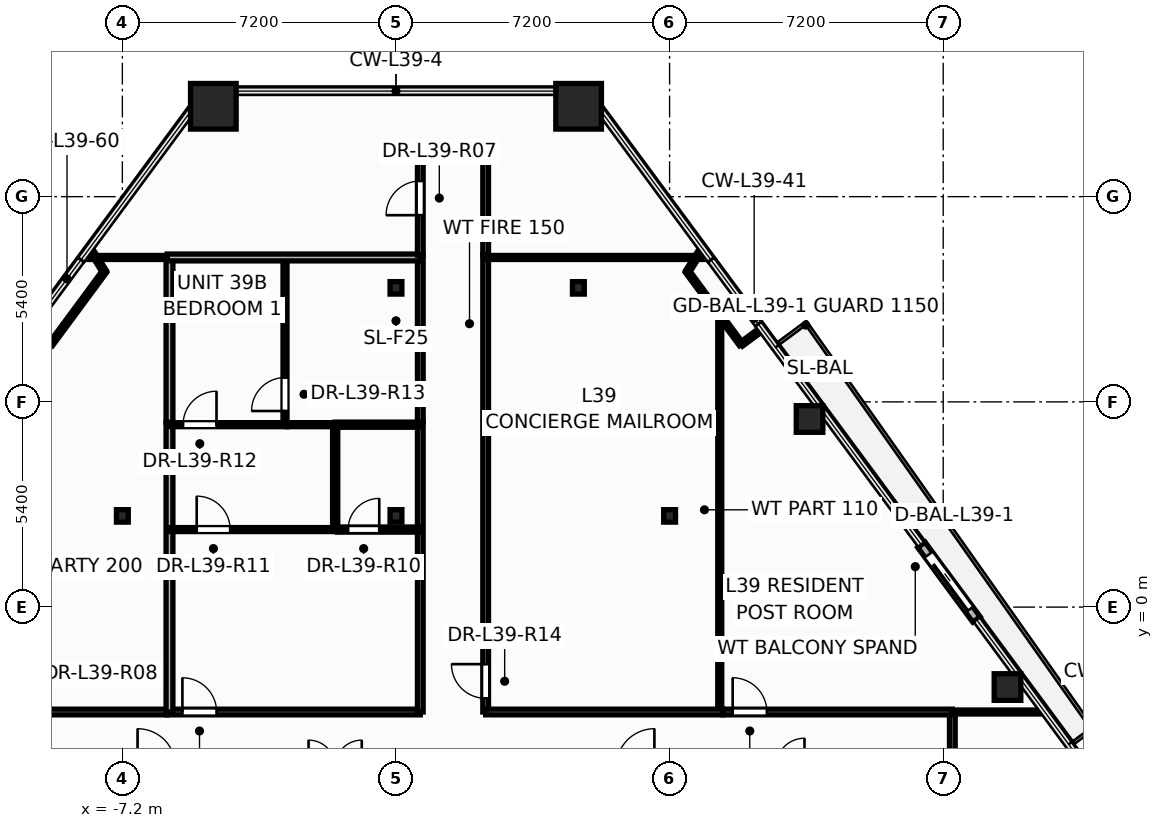
"""IFC4 building model, lengths in metres.
Left out: names, types, materials, properties, quantities, classifications, styles, units other than length and angle.
Written with IfcOpenShell. Run it as: python <this file> out.ifc"""

import sys

from ifc_helpers import new_model, si_unit, direction, frame, frame_2d, origin, origin_2d, place, context, subcontext, project, spatial, rectangle, hollow_rectangle, hollow_circle, i_section, extrude, element, fill, save


model = new_model("IFC4")
c1 = context("Model", 3, precision=1e-05, world=origin(), true_north=direction((0.0, 1.0)))
c2 = subcontext(c1, "Body", "Model", "MODEL_VIEW")
j1 = project(units=[si_unit("LENGTHUNIT", "METRE"), si_unit("PLANEANGLEUNIT", "RADIAN")], contexts=[c1])
p1 = place(None, origin())
s1 = spatial("IfcSite", under=j1, at=p1, CompositionType="ELEMENT")
p2 = place(p1, origin())
s2 = spatial("IfcBuilding", under=s1, at=p2, CompositionType="ELEMENT")
p3 = place(p2, frame((0.0, 0.0, 150.9)))
s3 = spatial("IfcBuildingStorey", under=s2, at=p3, CompositionType="ELEMENT", Elevation=150.9)
for number, where, z_axis, x_axis in (
    (1, (4.806, 13.178, 0.0), (0.0, 0.0, 1.0), (1.0, 0.0, 0.0)),
    (2, (-4.806, 13.178, 0.0), (0.0, 0.0, 1.0), (1.0, 0.0, 0.0)),
):
    element("IfcColumn", number, at=place(p3, frame(where, z_axis=z_axis, x_axis=x_axis)), inside=s3, PredefinedType="COLUMN", context=c2, shape_type="SweptSolid", body=[
        extrude(hollow_rectangle(XDim=1.2, YDim=1.2, WallThickness=0.055, at=origin_2d()), origin(), (0.0, 0.0, 1.0), 3.6),
    ])
for number, where, z_axis, x_axis in (
    (3, (16.092, -2.103, 0.0), (0.0, 0.0, 1.0), (1.0, 0.0, 0.0)),
    (4, (10.883, 4.95, 0.0), (0.0, 0.0, 1.0), (1.0, 0.0, 0.0)),
):
    element("IfcColumn", number, at=place(p3, frame(where, z_axis=z_axis, x_axis=x_axis)), inside=s3, PredefinedType="COLUMN", context=c2, shape_type="SweptSolid", body=[
        extrude(hollow_circle(Radius=0.35, WallThickness=0.03, at=origin_2d()), origin(), (0.0, 0.0, 1.0), 3.6),
    ])
for number, where, z_axis, x_axis in (
    (5, (-7.2, 2.4, 0.0), (0.0, 0.0, 1.0), (1.0, 0.0, 0.0)),
    (6, (0.0, 2.4, 0.0), (0.0, 0.0, 1.0), (1.0, 0.0, 0.0)),
    (7, (7.2, 2.4, 0.0), (0.0, 0.0, 1.0), (1.0, 0.0, 0.0)),
    (8, (-4.8, 8.4, 0.0), (0.0, 0.0, 1.0), (1.0, 0.0, 0.0)),
    (9, (0.0, 8.4, 0.0), (0.0, 0.0, 1.0), (1.0, 0.0, 0.0)),
    (10, (4.8, 8.4, 0.0), (0.0, 0.0, 1.0), (1.0, 0.0, 0.0)),
):
    element("IfcColumn", number, at=place(p3, frame(where, z_axis=z_axis, x_axis=x_axis)), inside=s3, PredefinedType="COLUMN", context=c2, shape_type="SweptSolid", body=[
        extrude(i_section(OverallWidth=0.311, OverallDepth=0.327, WebThickness=0.016, FlangeThickness=0.025, at=origin_2d()), origin(), (0.0, 0.0, 1.0), 3.6),
    ])
p4 = place(p3, frame((15.275, -0.324, -0.015), z_axis=(0.0, 0.0, 1.0), x_axis=(-0.594092829232, 0.804396488216, 0.0)))
e11 = element("IfcWall", 11, at=p4, inside=s3, PredefinedType="STANDARD", context=c2, shape_type="SweptSolid", body=[
    extrude(rectangle(XDim=2.44, YDim=0.24, at=frame_2d((1.22, 0.0))), origin(), (0.0, 0.0, 1.0), 2.807),
])
p5 = place(p4, frame((0.32, 0.0, 0.015)))
e12 = element("IfcOpeningElement", 12, at=p5, cuts=e11, PredefinedType="OPENING", context=c2, shape_type="SweptSolid", body=[
    extrude(rectangle(XDim=1.806, YDim=2.204, at=frame_2d((0.9, 1.102))), frame((0.0, 0.13, 0.0), z_axis=(0.0, -1.0, 0.0), x_axis=(1.0, 0.0, 0.0)), (0.0, 0.0, 1.0), 0.26),
])
p6 = place(p3, frame((2.36, -2.76, 0.0), z_axis=(0.0, 0.0, 1.0), x_axis=(0.0, 1.0, 0.0)))
e13 = element("IfcWall", 13, at=p6, inside=s3, PredefinedType="PARTITIONING", context=c2, shape_type="SweptSolid", body=[
    extrude(rectangle(XDim=12.02, YDim=0.15, at=frame_2d((6.01, 0.0))), origin(), (0.0, 0.0, 1.0), 2.325),
])
p7 = place(p6, frame((0.359, 0.0, 0.0)))
e14 = element("IfcOpeningElement", 14, at=p7, cuts=e13, PredefinedType="OPENING", context=c2, shape_type="SweptSolid", body=[
    extrude(rectangle(XDim=0.906, YDim=2.104, at=frame_2d((0.45, 1.052))), frame((0.0, 0.085, 0.0), z_axis=(0.0, -1.0, 0.0), x_axis=(1.0, 0.0, 0.0)), (0.0, 0.0, 1.0), 0.17),
])
p8 = place(p3, frame((8.52, -2.76, 0.0), z_axis=(0.0, 0.0, 1.0), x_axis=(0.0, 1.0, 0.0)))
e15 = element("IfcWall", 15, at=p8, inside=s3, PredefinedType="PARTITIONING", context=c2, shape_type="SweptSolid", body=[
    extrude(rectangle(XDim=10.64, YDim=0.105, at=frame_2d((5.32, 0.0))), origin(), (0.0, 0.0, 1.0), 2.617),
])
p9 = place(p3, frame((14.64, -10.8, 0.0), z_axis=(0.0, 0.0, 1.0), x_axis=(0.0, 1.0, 0.0)))
e16 = element("IfcWall", 16, at=p9, inside=s3, PredefinedType="PARTITIONING", context=c2, shape_type="SweptSolid", body=[
    extrude(rectangle(XDim=8.04, YDim=0.15, at=frame_2d((4.02, 0.0))), origin(), (0.0, 0.0, 1.0), 2.325),
])
p10 = place(p9, frame((0.359, 0.0, 0.0)))
e17 = element("IfcOpeningElement", 17, at=p10, cuts=e16, PredefinedType="OPENING", context=c2, shape_type="SweptSolid", body=[
    extrude(rectangle(XDim=0.906, YDim=2.104, at=frame_2d((0.45, 1.052))), frame((0.0, 0.085, 0.0), z_axis=(0.0, -1.0, 0.0), x_axis=(1.0, 0.0, 0.0)), (0.0, 0.0, 1.0), 0.17),
])
p11 = place(p3, frame((-6.02, -2.76, 0.0), z_axis=(0.0, 0.0, 1.0), x_axis=(1.0, 0.0, 0.0)))
e18 = element("IfcWall", 18, at=p11, inside=s3, PredefinedType="PARTITIONING", context=c2, shape_type="SweptSolid", body=[
    extrude(rectangle(XDim=6.66, YDim=0.15, at=frame_2d((3.33, 0.0))), origin(), (0.0, 0.0, 1.0), 2.325),
])
p12 = place(p11, frame((0.4, 0.0, 0.0)))
e19 = element("IfcOpeningElement", 19, at=p12, cuts=e18, PredefinedType="OPENING", context=c2, shape_type="SweptSolid", body=[
    extrude(rectangle(XDim=0.906, YDim=2.104, at=frame_2d((0.45, 1.052))), frame((0.0, 0.085, 0.0), z_axis=(0.0, -1.0, 0.0), x_axis=(1.0, 0.0, 0.0)), (0.0, 0.0, 1.0), 0.17),
])
p13 = place(p3, frame((-12.5, -2.76, 0.0), z_axis=(0.0, 0.0, 1.0), x_axis=(1.0, 0.0, 0.0)))
e20 = element("IfcWall", 20, at=p13, inside=s3, PredefinedType="PARTITIONING", context=c2, shape_type="SweptSolid", body=[
    extrude(rectangle(XDim=6.478, YDim=0.15, at=frame_2d((3.239, 0.0))), origin(), (0.0, 0.0, 1.0), 2.325),
])
p14 = place(p13, frame((1.674, 0.0, 0.0)))
e21 = element("IfcOpeningElement", 21, at=p14, cuts=e20, PredefinedType="OPENING", context=c2, shape_type="SweptSolid", body=[
    extrude(rectangle(XDim=0.906, YDim=2.104, at=frame_2d((0.45, 1.052))), frame((0.0, 0.085, 0.0), z_axis=(0.0, -1.0, 0.0), x_axis=(1.0, 0.0, 0.0)), (0.0, 0.0, 1.0), 0.17),
])
p15 = place(p3, frame((2.36, -2.76, 0.0), z_axis=(0.0, 0.0, 1.0), x_axis=(1.0, 0.0, 0.0)))
e22 = element("IfcWall", 22, at=p15, inside=s3, PredefinedType="PARTITIONING", context=c2, shape_type="SweptSolid", body=[
    extrude(rectangle(XDim=6.24, YDim=0.15, at=frame_2d((3.12, 0.0))), origin(), (0.0, 0.0, 1.0), 2.325),
])
p16 = place(p3, frame((8.602, -2.76, 0.0), z_axis=(0.0, 0.0, 1.0), x_axis=(1.0, 0.0, 0.0)))
e23 = element("IfcWall", 23, at=p16, inside=s3, PredefinedType="PARTITIONING", context=c2, shape_type="SweptSolid", body=[
    extrude(rectangle(XDim=6.038, YDim=0.15, at=frame_2d((3.019, 0.0))), origin(), (0.0, 0.0, 1.0), 3.35),
])
p17 = place(p16, frame((0.258, 0.0, 0.0)))
e24 = element("IfcOpeningElement", 24, at=p17, cuts=e23, PredefinedType="OPENING", context=c2, shape_type="SweptSolid", body=[
    extrude(rectangle(XDim=0.906, YDim=2.104, at=frame_2d((0.45, 1.052))), frame((0.0, 0.085, 0.0), z_axis=(0.0, -1.0, 0.0), x_axis=(1.0, 0.0, 0.0)), (0.0, 0.0, 1.0), 0.17),
])
p18 = place(p3, frame((2.36, 9.2, 0.0), z_axis=(0.0, 0.0, 1.0), x_axis=(1.0, 0.0, 0.0)))
e25 = element("IfcWall", 25, at=p18, inside=s3, PredefinedType="PARTITIONING", context=c2, shape_type="SweptSolid", body=[
    extrude(rectangle(XDim=5.76, YDim=0.105, at=frame_2d((2.88, 0.0))), origin(), (0.0, 0.0, 1.0), 2.617),
])
p19 = place(p3, frame((0.64, -2.76, 0.0), z_axis=(0.0, 0.0, 1.0), x_axis=(0.0, 1.0, 0.0)))
e26 = element("IfcWall", 26, at=p19, inside=s3, PredefinedType="PARTITIONING", context=c2, shape_type="SweptSolid", body=[
    extrude(rectangle(XDim=7.62, YDim=0.15, at=frame_2d((3.81, 0.0))), origin(), (0.0, 0.0, 1.0), 2.325),
])
p20 = place(p3, frame((-5.96, -2.76, 0.0), z_axis=(0.0, 0.0, 1.0), x_axis=(0.0, 1.0, 0.0)))
e27 = element("IfcWall", 27, at=p20, inside=s3, PredefinedType="PARTITIONING", context=c2, shape_type="SweptSolid", body=[
    extrude(rectangle(XDim=7.62, YDim=0.18, at=frame_2d((3.81, 0.0))), origin(), (0.0, 0.0, 1.0), 2.325),
])
p21 = place(p3, frame((0.64, 4.862, 0.0), z_axis=(0.0, 0.0, 1.0), x_axis=(0.0, 1.0, 0.0)))
e28 = element("IfcWall", 28, at=p21, inside=s3, PredefinedType="PARTITIONING", context=c2, shape_type="SweptSolid", body=[
    extrude(rectangle(XDim=4.398, YDim=0.15, at=frame_2d((2.199, 0.0))), origin(), (0.0, 0.0, 1.0), 2.617),
])
p22 = place(p3, frame((-5.96, 4.862, 0.0), z_axis=(0.0, 0.0, 1.0), x_axis=(0.0, 1.0, 0.0)))
e29 = element("IfcWall", 29, at=p22, inside=s3, PredefinedType="PARTITIONING", context=c2, shape_type="SweptSolid", body=[
    extrude(rectangle(XDim=4.338, YDim=0.18, at=frame_2d((2.169, 0.0))), origin(), (0.0, 0.0, 1.0), 2.617),
])
p23 = place(p3, frame((-5.96, 2.04, 0.0), z_axis=(0.0, 0.0, 1.0), x_axis=(1.0, 0.0, 0.0)))
e30 = element("IfcWall", 30, at=p23, inside=s3, PredefinedType="PARTITIONING", context=c2, shape_type="SweptSolid", body=[
    extrude(rectangle(XDim=4.42, YDim=0.105, at=frame_2d((2.21, 0.0))), origin(), (0.0, 0.0, 1.0), 2.919),
])
p24 = place(p23, frame((0.716, 0.0, 0.0)))
e31 = element("IfcOpeningElement", 31, at=p24, cuts=e30, PredefinedType="OPENING", context=c2, shape_type="SweptSolid", body=[
    extrude(rectangle(XDim=0.886, YDim=2.104, at=frame_2d((0.44, 1.052))), frame((0.0, 0.062, 0.0), z_axis=(0.0, -1.0, 0.0), x_axis=(1.0, 0.0, 0.0)), (0.0, 0.0, 1.0), 0.125),
])
p25 = place(p3, frame((-2.92, 4.8, 0.0), z_axis=(0.0, 0.0, 1.0), x_axis=(0.0, 1.0, 0.0)))
e32 = element("IfcWall", 32, at=p25, inside=s3, PredefinedType="PARTITIONING", context=c2, shape_type="SweptSolid", body=[
    extrude(rectangle(XDim=4.4, YDim=0.105, at=frame_2d((2.2, 0.0))), origin(), (0.0, 0.0, 1.0), 2.617),
])
p26 = place(p25, frame((0.36, 0.0, 0.0)))
e33 = element("IfcOpeningElement", 33, at=p26, cuts=e32, PredefinedType="OPENING", context=c2, shape_type="SweptSolid", body=[
    extrude(rectangle(XDim=0.886, YDim=2.104, at=frame_2d((0.44, 1.052))), frame((0.0, 0.062, 0.0), z_axis=(0.0, -1.0, 0.0), x_axis=(1.0, 0.0, 0.0)), (0.0, 0.0, 1.0), 0.125),
])
p27 = place(p3, frame((-6.02, 9.2, 0.0), z_axis=(0.0, 0.0, 1.0), x_axis=(1.0, 0.0, 0.0)))
e34 = element("IfcWall", 34, at=p27, inside=s3, PredefinedType="PARTITIONING", context=c2, shape_type="SweptSolid", body=[
    extrude(rectangle(XDim=6.66, YDim=0.18, at=frame_2d((3.33, 0.0))), origin(), (0.0, 0.0, 1.0), 2.617),
])
p28 = place(p3, frame((-5.96, 4.8, 0.0), z_axis=(0.0, 0.0, 1.0), x_axis=(1.0, 0.0, 0.0)))
e35 = element("IfcWall", 35, at=p28, inside=s3, PredefinedType="PARTITIONING", context=c2, shape_type="SweptSolid", body=[
    extrude(rectangle(XDim=3.1, YDim=0.105, at=frame_2d((1.55, 0.0))), origin(), (0.0, 0.0, 1.0), 3.35),
])
p29 = place(p28, frame((0.358, 0.0, 0.0)))
e36 = element("IfcOpeningElement", 36, at=p29, cuts=e35, PredefinedType="OPENING", context=c2, shape_type="SweptSolid", body=[
    extrude(rectangle(XDim=0.886, YDim=2.104, at=frame_2d((0.44, 1.052))), frame((0.0, 0.062, 0.0), z_axis=(0.0, -1.0, 0.0), x_axis=(1.0, 0.0, 0.0)), (0.0, 0.0, 1.0), 0.125),
])
p30 = place(p3, frame((-1.6, 2.04, 0.0), z_axis=(0.0, 0.0, 1.0), x_axis=(0.0, 1.0, 0.0)))
e37 = element("IfcWall", 37, at=p30, inside=s3, PredefinedType="PARTITIONING", context=c2, shape_type="SweptSolid", body=[
    extrude(rectangle(XDim=2.76, YDim=0.135, at=frame_2d((1.38, 0.0))), origin(), (0.0, 0.0, 1.0), 2.325),
])
p31 = place(p3, frame((0.64, 9.262, 0.0), z_axis=(0.0, 0.0, 1.0), x_axis=(0.0, 1.0, 0.0)))
e38 = element("IfcWall", 38, at=p31, inside=s3, PredefinedType="PARTITIONING", context=c2, shape_type="SweptSolid", body=[
    extrude(rectangle(XDim=2.538, YDim=0.15, at=frame_2d((1.269, 0.0))), origin(), (0.0, 0.0, 1.0), 3.35),
])
p32 = place(p31, frame((1.05, 0.0, 0.0)))
e39 = element("IfcOpeningElement", 39, at=p32, cuts=e38, PredefinedType="OPENING", context=c2, shape_type="SweptSolid", body=[
    extrude(rectangle(XDim=0.906, YDim=2.104, at=frame_2d((0.45, 1.052))), frame((0.0, 0.085, 0.0), z_axis=(0.0, -1.0, 0.0), x_axis=(1.0, 0.0, 0.0)), (0.0, 0.0, 1.0), 0.17),
])
p33 = place(p3, frame((2.36, 9.262, 0.0), z_axis=(0.0, 0.0, 1.0), x_axis=(0.0, 1.0, 0.0)))
e40 = element("IfcWall", 40, at=p33, inside=s3, PredefinedType="PARTITIONING", context=c2, shape_type="SweptSolid", body=[
    extrude(rectangle(XDim=2.538, YDim=0.15, at=frame_2d((1.269, 0.0))), origin(), (0.0, 0.0, 1.0), 3.35),
])
p34 = place(p3, frame((14.64, -2.76, 0.0), z_axis=(0.0, 0.0, 1.0), x_axis=(1.0, 0.0, 0.0)))
e41 = element("IfcWall", 41, at=p34, inside=s3, PredefinedType="PARTITIONING", context=c2, shape_type="SweptSolid", body=[
    extrude(rectangle(XDim=2.434, YDim=0.105, at=frame_2d((1.217, 0.0))), origin(), (0.0, 0.0, 1.0), 2.792),
])
for number, where, z_axis, x_axis in (
    (42, (-7.671, 8.827, 0.0), (0.0, 0.0, 1.0), (-0.594, -0.804, 0.0)),
    (43, (9.084, 6.914, 0.0), (0.0, 0.0, 1.0), (-0.594, 0.804, 0.0)),
):
    element("IfcWall", number, at=place(p3, frame(where, z_axis=z_axis, x_axis=x_axis)), inside=s3, PredefinedType="PARTITIONING", context=c2, shape_type="SweptSolid", body=[
        extrude(rectangle(XDim=2.378, YDim=0.12, at=frame_2d((1.189, 0.0))), origin(), (0.0, 0.0, 1.0), 3.35),
    ])
p35 = place(p3, frame((-1.538, 2.04, 0.0), z_axis=(0.0, 0.0, 1.0), x_axis=(1.0, 0.0, 0.0)))
e44 = element("IfcWall", 44, at=p35, inside=s3, PredefinedType="PARTITIONING", context=c2, shape_type="SweptSolid", body=[
    extrude(rectangle(XDim=2.178, YDim=0.135, at=frame_2d((1.089, 0.0))), origin(), (0.0, 0.0, 1.0), 2.325),
])
p36 = place(p35, frame((0.278, 0.0, 0.0)))
e45 = element("IfcOpeningElement", 45, at=p36, cuts=e44, PredefinedType="OPENING", context=c2, shape_type="SweptSolid", body=[
    extrude(rectangle(XDim=0.826, YDim=2.104, at=frame_2d((0.41, 1.052))), frame((0.0, 0.078, 0.0), z_axis=(0.0, -1.0, 0.0), x_axis=(1.0, 0.0, 0.0)), (0.0, 0.0, 1.0), 0.155),
])
p37 = place(p3, frame((-1.6, 4.8, 0.0), z_axis=(0.0, 0.0, 1.0), x_axis=(1.0, 0.0, 0.0)))
e46 = element("IfcWall", 46, at=p37, inside=s3, PredefinedType="PARTITIONING", context=c2, shape_type="SweptSolid", body=[
    extrude(rectangle(XDim=2.24, YDim=0.135, at=frame_2d((1.12, 0.0))), origin(), (0.0, 0.0, 1.0), 2.325),
])
p38 = place(p3, frame((-8.12, 9.2, 0.0), z_axis=(0.0, 0.0, 1.0), x_axis=(1.0, 0.0, 0.0)))
e47 = element("IfcWall", 47, at=p38, inside=s3, PredefinedType="PARTITIONING", context=c2, shape_type="SweptSolid", body=[
    extrude(rectangle(XDim=2.098, YDim=0.105, at=frame_2d((1.049, 0.0))), origin(), (0.0, 0.0, 1.0), 2.792),
])
p39 = place(p3, frame((0.64, 11.8, 0.0), z_axis=(0.0, 0.0, 1.0), x_axis=(1.0, 0.0, 0.0)))
e48 = element("IfcWall", 48, at=p39, inside=s3, PredefinedType="PARTITIONING", context=c2, shape_type="SweptSolid", body=[
    extrude(rectangle(XDim=1.72, YDim=0.15, at=frame_2d((0.86, 0.0))), origin(), (0.0, 0.0, 1.0), 3.35),
])
p40 = place(p3, frame((-2.858, 4.8, 0.0), z_axis=(0.0, 0.0, 1.0), x_axis=(1.0, 0.0, 0.0)))
e49 = element("IfcWall", 49, at=p40, inside=s3, PredefinedType="PARTITIONING", context=c2, shape_type="SweptSolid", body=[
    extrude(rectangle(XDim=1.258, YDim=0.105, at=frame_2d((0.629, 0.0))), origin(), (0.0, 0.0, 1.0), 2.919),
])
for number, where, z_axis, x_axis in (
    (50, (-8.054, 9.437, 0.0), (0.0, 0.0, 1.0), (0.532, -0.847, 0.0)),
    (51, (7.671, 8.827, 0.0), (0.0, 0.0, 1.0), (0.532, 0.847, 0.0)),
):
    element("IfcWall", number, at=place(p3, frame(where, z_axis=z_axis, x_axis=x_axis)), inside=s3, PredefinedType="PARTITIONING", context=c2, shape_type="SweptSolid", body=[
        extrude(rectangle(XDim=0.72, YDim=0.12, at=frame_2d((0.36, 0.0))), origin(), (0.0, 0.0, 1.0), 2.792),
    ])
for number, where, z_axis, x_axis in (
    (52, (-9.084, 6.914, 0.0), (0.0, 0.0, 1.0), (-0.804, 0.594, 0.0)),
    (53, (9.623, 7.312, 0.0), (0.0, 0.0, 1.0), (-0.804, -0.594, 0.0)),
):
    element("IfcWall", number, at=place(p3, frame(where, z_axis=z_axis, x_axis=x_axis)), inside=s3, PredefinedType="PARTITIONING", context=c2, shape_type="SweptSolid", body=[
        extrude(rectangle(XDim=0.67, YDim=0.12, at=frame_2d((0.335, 0.0))), origin(), (0.0, 0.0, 1.0), 2.792),
    ])
p41 = place(p5, origin())
e54 = element("IfcDoor", 54, at=p41, inside=s3, OperationType="SLIDING_TO_LEFT", PredefinedType="DOOR", context=c2, shape_type="SweptSolid", body=[
    extrude(rectangle(XDim=1.8, YDim=2.2, at=frame_2d((0.9, 1.1))), frame((0.0, 0.025, 0.0), z_axis=(0.0, -1.0, 0.0), x_axis=(1.0, 0.0, 0.0)), (0.0, 0.0, 1.0), 0.05),
])
fill(e12, e54)
p42 = place(p32, origin())
e55 = element("IfcDoor", 55, at=p42, inside=s3, OperationType="SINGLE_SWING_LEFT", PredefinedType="DOOR", context=c2, shape_type="SweptSolid", body=[
    extrude(rectangle(XDim=0.9, YDim=2.1, at=frame_2d((0.45, 1.05))), frame((0.0, 0.025, 0.0), z_axis=(0.0, -1.0, 0.0), x_axis=(1.0, 0.0, 0.0)), (0.0, 0.0, 1.0), 0.05),
])
fill(e39, e55)
p43 = place(p12, origin())
e56 = element("IfcDoor", 56, at=p43, inside=s3, OperationType="SINGLE_SWING_LEFT", PredefinedType="DOOR", context=c2, shape_type="SweptSolid", body=[
    extrude(rectangle(XDim=0.9, YDim=2.1, at=frame_2d((0.45, 1.05))), frame((0.0, 0.025, 0.0), z_axis=(0.0, -1.0, 0.0), x_axis=(1.0, 0.0, 0.0)), (0.0, 0.0, 1.0), 0.05),
])
fill(e19, e56)
p44 = place(p36, origin())
e57 = element("IfcDoor", 57, at=p44, inside=s3, OperationType="SINGLE_SWING_RIGHT", PredefinedType="DOOR", context=c2, shape_type="SweptSolid", body=[
    extrude(rectangle(XDim=0.82, YDim=2.1, at=frame_2d((0.41, 1.05))), frame((0.0, 0.025, 0.0), z_axis=(0.0, -1.0, 0.0), x_axis=(1.0, 0.0, 0.0)), (0.0, 0.0, 1.0), 0.05),
])
fill(e45, e57)
p45 = place(p24, origin())
e58 = element("IfcDoor", 58, at=p45, inside=s3, OperationType="SINGLE_SWING_LEFT", PredefinedType="DOOR", context=c2, shape_type="SweptSolid", body=[
    extrude(rectangle(XDim=0.88, YDim=2.1, at=frame_2d((0.44, 1.05))), frame((0.0, 0.025, 0.0), z_axis=(0.0, -1.0, 0.0), x_axis=(1.0, 0.0, 0.0)), (0.0, 0.0, 1.0), 0.05),
])
fill(e31, e58)
p46 = place(p29, origin())
e59 = element("IfcDoor", 59, at=p46, inside=s3, OperationType="SINGLE_SWING_RIGHT", PredefinedType="DOOR", context=c2, shape_type="SweptSolid", body=[
    extrude(rectangle(XDim=0.88, YDim=2.1, at=frame_2d((0.44, 1.05))), frame((0.0, 0.025, 0.0), z_axis=(0.0, -1.0, 0.0), x_axis=(1.0, 0.0, 0.0)), (0.0, 0.0, 1.0), 0.05),
])
fill(e36, e59)
p47 = place(p26, origin())
e60 = element("IfcDoor", 60, at=p47, inside=s3, OperationType="SINGLE_SWING_LEFT", PredefinedType="DOOR", context=c2, shape_type="SweptSolid", body=[
    extrude(rectangle(XDim=0.88, YDim=2.1, at=frame_2d((0.44, 1.05))), frame((0.0, 0.025, 0.0), z_axis=(0.0, -1.0, 0.0), x_axis=(1.0, 0.0, 0.0)), (0.0, 0.0, 1.0), 0.05),
])
fill(e33, e60)
p48 = place(p7, origin())
e61 = element("IfcDoor", 61, at=p48, inside=s3, OperationType="SINGLE_SWING_RIGHT", PredefinedType="DOOR", context=c2, shape_type="SweptSolid", body=[
    extrude(rectangle(XDim=0.9, YDim=2.1, at=frame_2d((0.45, 1.05))), frame((0.0, 0.025, 0.0), z_axis=(0.0, -1.0, 0.0), x_axis=(1.0, 0.0, 0.0)), (0.0, 0.0, 1.0), 0.05),
])
fill(e14, e61)
p49 = place(p17, origin())
e62 = element("IfcDoor", 62, at=p49, inside=s3, OperationType="SINGLE_SWING_LEFT", PredefinedType="DOOR", context=c2, shape_type="SweptSolid", body=[
    extrude(rectangle(XDim=0.9, YDim=2.1, at=frame_2d((0.45, 1.05))), frame((0.0, 0.025, 0.0), z_axis=(0.0, -1.0, 0.0), x_axis=(1.0, 0.0, 0.0)), (0.0, 0.0, 1.0), 0.05),
])
fill(e24, e62)
save(model, sys.argv[1])
